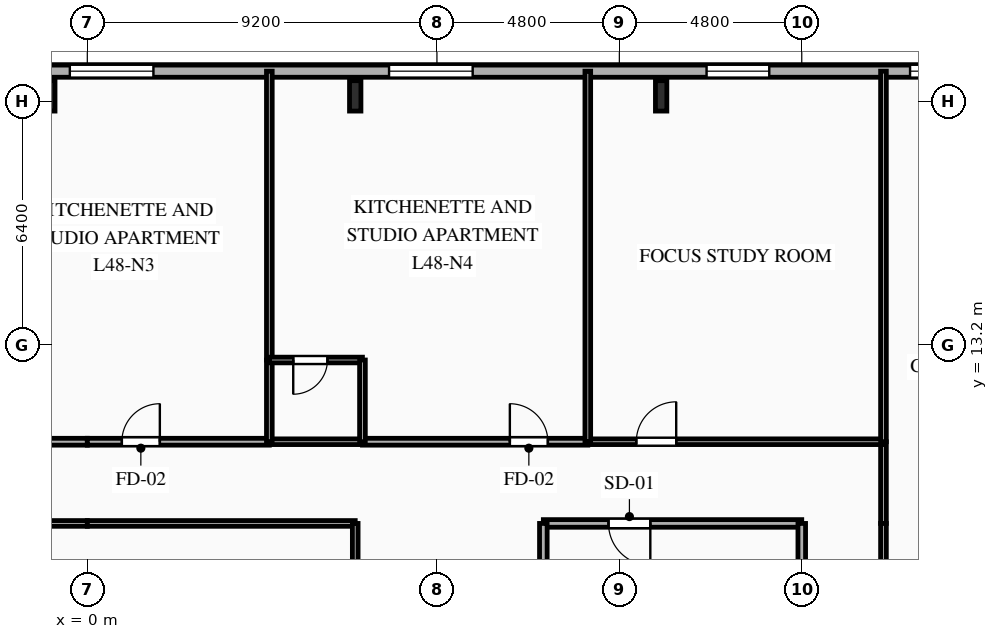
"""IFC4 building model, lengths in metres.
Left out: names, types, materials, properties, quantities, classifications, styles, units other than length and angle.
Written with IfcOpenShell. Run it as: python <this file> out.ifc"""

import sys

from ifc_helpers import new_model, si_unit, direction, frame, frame_2d, origin, origin_2d, place, context, subcontext, project, spatial, rectangle, i_section, extrude, element, fill, save


model = new_model("IFC4")
c1 = context("Model", 3, precision=1e-05, world=origin(), true_north=direction((0.0, 1.0)))
c2 = subcontext(c1, "Body", "Model", "MODEL_VIEW")
j1 = project(units=[si_unit("LENGTHUNIT", "METRE"), si_unit("PLANEANGLEUNIT", "RADIAN")], contexts=[c1])
p1 = place(None, origin())
s1 = spatial("IfcSite", under=j1, at=p1, CompositionType="ELEMENT")
p2 = place(p1, origin())
s2 = spatial("IfcBuilding", under=s1, at=p2, CompositionType="ELEMENT")
p3 = place(p2, frame((0.0, 0.0, 171.2)))
s3 = spatial("IfcBuildingStorey", under=s2, at=p3, CompositionType="ELEMENT", Elevation=171.2)
for number, where, z_axis, x_axis in (
    (1, (15.1, 19.75, 0.0), (0.0, 0.0, 1.0), (1.0, 0.0, 0.0)),
    (2, (7.05, 19.75, 0.0), (0.0, 0.0, 1.0), (1.0, 0.0, 0.0)),
    (3, (-1.0, 19.75, 0.0), (0.0, 0.0, 1.0), (1.0, 0.0, 0.0)),
):
    element("IfcColumn", number, at=place(p3, frame(where, z_axis=z_axis, x_axis=x_axis)), inside=s3, PredefinedType="COLUMN", context=c2, shape_type="SweptSolid", body=[
        extrude(i_section(OverallWidth=0.3, OverallDepth=0.8, WebThickness=0.018, FlangeThickness=0.033, FilletRadius=0.03, at=origin_2d()), origin(), (0.0, 0.0, 1.0), 3.35),
    ])
p4 = place(p3, frame((-25.8, 20.4, 0.0), z_axis=(0.0, 0.0, 1.0), x_axis=(1.0, 0.0, 0.0)))
e4 = element("IfcWall", 4, at=p4, inside=s3, PredefinedType="SOLIDWALL", context=c2, shape_type="SweptSolid", body=[
    extrude(rectangle(XDim=49.6, YDim=0.32, at=frame_2d((24.8, 0.0))), origin(), (0.0, 0.0, 1.0), 3.0),
])
p5 = place(p4, frame((2.135, 0.0, 0.85)))
e5 = element("IfcOpeningElement", 5, at=p5, cuts=e4, PredefinedType="OPENING", context=c2, shape_type="SweptSolid", body=[
    extrude(rectangle(XDim=1.65, YDim=1.85, at=frame_2d((0.825, 0.925))), frame((0.0, 0.17, 0.0), z_axis=(0.0, -1.0, 0.0), x_axis=(1.0, 0.0, 0.0)), (0.0, 0.0, 1.0), 0.34),
])
p6 = place(p4, frame((6.295, 0.0, 0.85)))
e6 = element("IfcOpeningElement", 6, at=p6, cuts=e4, PredefinedType="OPENING", context=c2, shape_type="SweptSolid", body=[
    extrude(rectangle(XDim=1.65, YDim=1.85, at=frame_2d((0.825, 0.925))), frame((0.0, 0.17, 0.0), z_axis=(0.0, -1.0, 0.0), x_axis=(1.0, 0.0, 0.0)), (0.0, 0.0, 1.0), 0.34),
])
p7 = place(p4, frame((10.775, 0.0, 0.85)))
e7 = element("IfcOpeningElement", 7, at=p7, cuts=e4, PredefinedType="OPENING", context=c2, shape_type="SweptSolid", body=[
    extrude(rectangle(XDim=1.65, YDim=1.85, at=frame_2d((0.825, 0.925))), frame((0.0, 0.17, 0.0), z_axis=(0.0, -1.0, 0.0), x_axis=(1.0, 0.0, 0.0)), (0.0, 0.0, 1.0), 0.34),
])
p8 = place(p4, frame((18.49, 0.0, 0.85)))
e8 = element("IfcOpeningElement", 8, at=p8, cuts=e4, PredefinedType="OPENING", context=c2, shape_type="SweptSolid", body=[
    extrude(rectangle(XDim=1.5, YDim=1.85, at=frame_2d((0.75, 0.925))), frame((0.0, 0.17, 0.0), z_axis=(0.0, -1.0, 0.0), x_axis=(1.0, 0.0, 0.0)), (0.0, 0.0, 1.0), 0.34),
])
p9 = place(p4, frame((25.34, 0.0, 0.85)))
e9 = element("IfcOpeningElement", 9, at=p9, cuts=e4, PredefinedType="OPENING", context=c2, shape_type="SweptSolid", body=[
    extrude(rectangle(XDim=2.2, YDim=1.85, at=frame_2d((1.1, 0.925))), frame((0.0, 0.17, 0.0), z_axis=(0.0, -1.0, 0.0), x_axis=(1.0, 0.0, 0.0)), (0.0, 0.0, 1.0), 0.34),
])
p10 = place(p4, frame((33.74, 0.0, 0.85)))
e10 = element("IfcOpeningElement", 10, at=p10, cuts=e4, PredefinedType="OPENING", context=c2, shape_type="SweptSolid", body=[
    extrude(rectangle(XDim=2.2, YDim=1.85, at=frame_2d((1.1, 0.925))), frame((0.0, 0.17, 0.0), z_axis=(0.0, -1.0, 0.0), x_axis=(1.0, 0.0, 0.0)), (0.0, 0.0, 1.0), 0.34),
])
p11 = place(p4, frame((42.095, 0.0, 0.85)))
e11 = element("IfcOpeningElement", 11, at=p11, cuts=e4, PredefinedType="OPENING", context=c2, shape_type="SweptSolid", body=[
    extrude(rectangle(XDim=1.65, YDim=1.85, at=frame_2d((0.825, 0.925))), frame((0.0, 0.17, 0.0), z_axis=(0.0, -1.0, 0.0), x_axis=(1.0, 0.0, 0.0)), (0.0, 0.0, 1.0), 0.34),
])
p12 = place(p4, frame((47.45, 0.0, 0.85)))
e12 = element("IfcOpeningElement", 12, at=p12, cuts=e4, PredefinedType="OPENING", context=c2, shape_type="SweptSolid", body=[
    extrude(rectangle(XDim=1.1, YDim=1.85, at=frame_2d((0.55, 0.925))), frame((0.0, 0.17, 0.0), z_axis=(0.0, -1.0, 0.0), x_axis=(1.0, 0.0, 0.0)), (0.0, 0.0, 1.0), 0.34),
])
p13 = place(p3, frame((18.8, 8.5, 0.0), z_axis=(0.0, 0.0, 1.0), x_axis=(-1.0, 0.0, 0.0)))
e13 = element("IfcWall", 13, at=p13, inside=s3, PredefinedType="PARTITIONING", context=c2, shape_type="SweptSolid", body=[
    extrude(rectangle(XDim=6.8, YDim=0.2, at=frame_2d((3.4, 0.0))), origin(), (0.0, 0.0, 1.0), 3.0),
])
p14 = place(p13, frame((3.985, 0.0, 0.0)))
e14 = element("IfcOpeningElement", 14, at=p14, cuts=e13, PredefinedType="OPENING", context=c2, shape_type="SweptSolid", body=[
    extrude(rectangle(XDim=1.1, YDim=2.15, at=frame_2d((0.55, 1.075))), frame((0.0, 0.11, 0.0), z_axis=(0.0, -1.0, 0.0), x_axis=(1.0, 0.0, 0.0)), (0.0, 0.0, 1.0), 0.22),
])
p15 = place(p3, frame((18.8, 5.6, 0.0), z_axis=(0.0, 0.0, 1.0), x_axis=(0.0, 1.0, 0.0)))
e15 = element("IfcWall", 15, at=p15, inside=s3, PredefinedType="PARTITIONING", context=c2, shape_type="SweptSolid", body=[
    extrude(rectangle(XDim=2.9, YDim=0.2, at=frame_2d((1.45, 0.0))), origin(), (0.0, 0.0, 1.0), 2.485),
])
p16 = place(p3, frame((12.0, 8.5, 0.0), z_axis=(0.0, 0.0, 1.0), x_axis=(0.0, -1.0, 0.0)))
e16 = element("IfcWall", 16, at=p16, inside=s3, PredefinedType="PARTITIONING", context=c2, shape_type="SweptSolid", body=[
    extrude(rectangle(XDim=2.9, YDim=0.2, at=frame_2d((1.45, 0.0))), origin(), (0.0, 0.0, 1.0), 3.0),
])
p17 = place(p3, frame((-1.14, 10.65, 0.0), z_axis=(0.0, 0.0, 1.0), x_axis=(1.0, 0.0, 0.0)))
e17 = element("IfcWall", 17, at=p17, inside=s3, PredefinedType="PARTITIONING", context=c2, shape_type="SweptSolid", body=[
    extrude(rectangle(XDim=1.14, YDim=0.18, at=frame_2d((0.57, 0.0))), origin(), (0.0, 0.0, 1.0), 3.0),
])
p18 = place(p3, frame((0.0, 8.5, 0.0), z_axis=(0.0, 0.0, 1.0), x_axis=(-1.0, 0.0, 0.0)))
e18 = element("IfcWall", 18, at=p18, inside=s3, PredefinedType="PARTITIONING", context=c2, shape_type="SweptSolid", body=[
    extrude(rectangle(XDim=7.05, YDim=0.15, at=frame_2d((3.525, 0.0))), origin(), (0.0, 0.0, 1.0), 3.0),
])
p19 = place(p3, frame((20.95, 10.65, 0.0), z_axis=(0.0, 0.0, 1.0), x_axis=(0.0, -1.0, 0.0)))
e19 = element("IfcWall", 19, at=p19, inside=s3, PredefinedType="PARTITIONING", context=c2, shape_type="SweptSolid", body=[
    extrude(rectangle(XDim=2.15, YDim=0.15, at=frame_2d((1.075, 0.0))), origin(), (0.0, 0.0, 1.0), 3.0),
])
p20 = place(p3, frame((0.0, 10.65, 0.0), z_axis=(0.0, 0.0, 1.0), x_axis=(1.0, 0.0, 0.0)))
e20 = element("IfcWall", 20, at=p20, inside=s3, PredefinedType="PARTITIONING", context=c2, shape_type="SweptSolid", body=[
    extrude(rectangle(XDim=4.79, YDim=0.18, at=frame_2d((2.395, 0.0))), origin(), (0.0, 0.0, 1.0), 3.0),
])
p21 = place(p20, frame((0.909, 0.0, 0.0)))
e21 = element("IfcOpeningElement", 21, at=p21, cuts=e20, PredefinedType="OPENING", context=c2, shape_type="SweptSolid", body=[
    extrude(rectangle(XDim=1.0, YDim=2.15, at=frame_2d((0.5, 1.075))), frame((0.0, 0.1, 0.0), z_axis=(0.0, -1.0, 0.0), x_axis=(1.0, 0.0, 0.0)), (0.0, 0.0, 1.0), 0.2),
])
p22 = place(p3, frame((7.24, 10.65, 0.0), z_axis=(0.0, 0.0, 1.0), x_axis=(1.0, 0.0, 0.0)))
e22 = element("IfcWall", 22, at=p22, inside=s3, PredefinedType="PARTITIONING", context=c2, shape_type="SweptSolid", body=[
    extrude(rectangle(XDim=5.93, YDim=0.18, at=frame_2d((2.965, 0.0))), origin(), (0.0, 0.0, 1.0), 3.0),
])
p23 = place(p22, frame((3.879, 0.0, 0.0)))
e23 = element("IfcOpeningElement", 23, at=p23, cuts=e22, PredefinedType="OPENING", context=c2, shape_type="SweptSolid", body=[
    extrude(rectangle(XDim=1.0, YDim=2.15, at=frame_2d((0.5, 1.075))), frame((0.0, 0.1, 0.0), z_axis=(0.0, -1.0, 0.0), x_axis=(1.0, 0.0, 0.0)), (0.0, 0.0, 1.0), 0.2),
])
p24 = place(p3, frame((4.79, 10.65, 0.0), z_axis=(0.0, 0.0, 1.0), x_axis=(1.0, 0.0, 0.0)))
e24 = element("IfcWall", 24, at=p24, inside=s3, PredefinedType="PLUMBINGWALL", context=c2, shape_type="SweptSolid", body=[
    extrude(rectangle(XDim=2.45, YDim=0.15, at=frame_2d((1.225, 0.0))), origin(), (0.0, 0.0, 1.0), 3.0),
])
p25 = place(p3, frame((13.17, 10.65, 0.0), z_axis=(0.0, 0.0, 1.0), x_axis=(1.0, 0.0, 0.0)))
e25 = element("IfcWall", 25, at=p25, inside=s3, PredefinedType="PARTITIONING", context=c2, shape_type="SweptSolid", body=[
    extrude(rectangle(XDim=7.78, YDim=0.15, at=frame_2d((3.89, 0.0))), origin(), (0.0, 0.0, 1.0), 3.0),
])
p26 = place(p25, frame((1.276, 0.0, 0.0)))
e26 = element("IfcOpeningElement", 26, at=p26, cuts=e25, PredefinedType="OPENING", context=c2, shape_type="SweptSolid", body=[
    extrude(rectangle(XDim=1.05, YDim=2.15, at=frame_2d((0.525, 1.075))), frame((0.0, 0.085, 0.0), z_axis=(0.0, -1.0, 0.0), x_axis=(1.0, 0.0, 0.0)), (0.0, 0.0, 1.0), 0.17),
])
p27 = place(p3, frame((7.05, 8.5, 0.0), z_axis=(0.0, 0.0, 1.0), x_axis=(-1.0, 0.0, 0.0)))
e27 = element("IfcWall", 27, at=p27, inside=s3, PredefinedType="PARTITIONING", context=c2, shape_type="SweptSolid", body=[
    extrude(rectangle(XDim=7.05, YDim=0.15, at=frame_2d((3.525, 0.0))), origin(), (0.0, 0.0, 1.0), 3.0),
])
p28 = place(p3, frame((20.95, 8.5, 0.0), z_axis=(0.0, 0.0, 1.0), x_axis=(0.0, -1.0, 0.0)))
e28 = element("IfcWall", 28, at=p28, inside=s3, PredefinedType="PARTITIONING", context=c2, shape_type="SweptSolid", body=[
    extrude(rectangle(XDim=6.1, YDim=0.15, at=frame_2d((3.05, 0.0))), origin(), (0.0, 0.0, 1.0), 3.0),
])
p29 = place(p28, frame((3.984, 0.0, 0.0)))
e29 = element("IfcOpeningElement", 29, at=p29, cuts=e28, PredefinedType="OPENING", context=c2, shape_type="SweptSolid", body=[
    extrude(rectangle(XDim=1.05, YDim=2.15, at=frame_2d((0.525, 1.075))), frame((0.0, 0.085, 0.0), z_axis=(0.0, -1.0, 0.0), x_axis=(1.0, 0.0, 0.0)), (0.0, 0.0, 1.0), 0.17),
])
p30 = place(p3, frame((7.05, -0.8, 0.0), z_axis=(0.0, 0.0, 1.0), x_axis=(0.0, 1.0, 0.0)))
e30 = element("IfcWall", 30, at=p30, inside=s3, PredefinedType="PARTITIONING", context=c2, shape_type="SweptSolid", body=[
    extrude(rectangle(XDim=9.3, YDim=0.15, at=frame_2d((4.65, 0.0))), origin(), (0.0, 0.0, 1.0), 3.0),
])
p31 = place(p3, frame((20.95, 10.65, 0.0), z_axis=(0.0, 0.0, 1.0), x_axis=(0.0, 1.0, 0.0)))
e31 = element("IfcWall", 31, at=p31, inside=s3, PredefinedType="PARTITIONING", context=c2, shape_type="SweptSolid", body=[
    extrude(rectangle(XDim=9.75, YDim=0.15, at=frame_2d((4.875, 0.0))), origin(), (0.0, 0.0, 1.0), 2.485),
])
p32 = place(p3, frame((4.79, 20.4, 0.0), z_axis=(0.0, 0.0, 1.0), x_axis=(0.0, -1.0, 0.0)))
e32 = element("IfcWall", 32, at=p32, inside=s3, PredefinedType="PARTITIONING", context=c2, shape_type="SweptSolid", body=[
    extrude(rectangle(XDim=7.6, YDim=0.15, at=frame_2d((3.8, 0.0))), origin(), (0.0, 0.0, 1.0), 3.0),
])
p33 = place(p3, frame((4.79, 12.8, 0.0), z_axis=(0.0, 0.0, 1.0), x_axis=(0.0, -1.0, 0.0)))
e33 = element("IfcWall", 33, at=p33, inside=s3, PredefinedType="PLUMBINGWALL", context=c2, shape_type="SweptSolid", body=[
    extrude(rectangle(XDim=2.15, YDim=0.15, at=frame_2d((1.075, 0.0))), origin(), (0.0, 0.0, 1.0), 3.0),
])
p34 = place(p3, frame((7.24, 12.8, 0.0), z_axis=(0.0, 0.0, 1.0), x_axis=(-1.0, 0.0, 0.0)))
e34 = element("IfcWall", 34, at=p34, inside=s3, PredefinedType="PLUMBINGWALL", context=c2, shape_type="SweptSolid", body=[
    extrude(rectangle(XDim=2.45, YDim=0.15, at=frame_2d((1.225, 0.0))), origin(), (0.0, 0.0, 1.0), 3.0),
])
p35 = place(p34, frame((0.921, 0.0, 0.0)))
e35 = element("IfcOpeningElement", 35, at=p35, cuts=e34, PredefinedType="OPENING", context=c2, shape_type="SweptSolid", body=[
    extrude(rectangle(XDim=0.9, YDim=2.1, at=frame_2d((0.45, 1.05))), frame((0.0, 0.085, 0.0), z_axis=(0.0, -1.0, 0.0), x_axis=(1.0, 0.0, 0.0)), (0.0, 0.0, 1.0), 0.17),
])
p36 = place(p3, frame((7.24, 10.65, 0.0), z_axis=(0.0, 0.0, 1.0), x_axis=(0.0, 1.0, 0.0)))
e36 = element("IfcWall", 36, at=p36, inside=s3, PredefinedType="PLUMBINGWALL", context=c2, shape_type="SweptSolid", body=[
    extrude(rectangle(XDim=2.15, YDim=0.15, at=frame_2d((1.075, 0.0))), origin(), (0.0, 0.0, 1.0), 3.0),
])
p37 = place(p3, frame((13.17, 20.4, 0.0), z_axis=(0.0, 0.0, 1.0), x_axis=(0.0, -1.0, 0.0)))
e37 = element("IfcWall", 37, at=p37, inside=s3, PredefinedType="PARTITIONING", context=c2, shape_type="SweptSolid", body=[
    extrude(rectangle(XDim=9.75, YDim=0.15, at=frame_2d((4.875, 0.0))), origin(), (0.0, 0.0, 1.0), 3.0),
])
p38 = place(p9, origin())
e38 = element("IfcWindow", 38, at=p38, inside=s3, PartitioningType="SINGLE_PANEL", PredefinedType="WINDOW", context=c2, shape_type="SweptSolid", body=[
    extrude(rectangle(XDim=2.2, YDim=1.85, at=frame_2d((1.1, 0.925))), frame((0.0, 0.03, 0.0), z_axis=(0.0, -1.0, 0.0), x_axis=(1.0, 0.0, 0.0)), (0.0, 0.0, 1.0), 0.06),
])
fill(e9, e38)
p39 = place(p10, origin())
e39 = element("IfcWindow", 39, at=p39, inside=s3, PartitioningType="SINGLE_PANEL", PredefinedType="WINDOW", context=c2, shape_type="SweptSolid", body=[
    extrude(rectangle(XDim=2.2, YDim=1.85, at=frame_2d((1.1, 0.925))), frame((0.0, 0.03, 0.0), z_axis=(0.0, -1.0, 0.0), x_axis=(1.0, 0.0, 0.0)), (0.0, 0.0, 1.0), 0.06),
])
fill(e10, e39)
p40 = place(p11, origin())
e40 = element("IfcWindow", 40, at=p40, inside=s3, PartitioningType="SINGLE_PANEL", PredefinedType="WINDOW", context=c2, shape_type="SweptSolid", body=[
    extrude(rectangle(XDim=1.65, YDim=1.85, at=frame_2d((0.825, 0.925))), frame((0.0, 0.03, 0.0), z_axis=(0.0, -1.0, 0.0), x_axis=(1.0, 0.0, 0.0)), (0.0, 0.0, 1.0), 0.06),
])
fill(e11, e40)
p41 = place(p12, origin())
e41 = element("IfcWindow", 41, at=p41, inside=s3, PartitioningType="SINGLE_PANEL", PredefinedType="WINDOW", context=c2, shape_type="SweptSolid", body=[
    extrude(rectangle(XDim=1.1, YDim=1.85, at=frame_2d((0.55, 0.925))), frame((0.0, 0.03, 0.0), z_axis=(0.0, -1.0, 0.0), x_axis=(1.0, 0.0, 0.0)), (0.0, 0.0, 1.0), 0.06),
])
fill(e12, e41)
p42 = place(p14, origin())
e42 = element("IfcDoor", 42, at=p42, inside=s3, OperationType="SINGLE_SWING_LEFT", PredefinedType="DOOR", context=c2, shape_type="SweptSolid", body=[
    extrude(rectangle(XDim=1.1, YDim=2.15, at=frame_2d((0.55, 1.075))), frame((0.0, 0.025, 0.0), z_axis=(0.0, -1.0, 0.0), x_axis=(1.0, 0.0, 0.0)), (0.0, 0.0, 1.0), 0.05),
])
fill(e14, e42)
p43 = place(p21, origin())
e43 = element("IfcDoor", 43, at=p43, inside=s3, OperationType="SINGLE_SWING_RIGHT", PredefinedType="DOOR", context=c2, shape_type="SweptSolid", body=[
    extrude(rectangle(XDim=1.0, YDim=2.15, at=frame_2d((0.5, 1.075))), frame((0.0, 0.025, 0.0), z_axis=(0.0, -1.0, 0.0), x_axis=(1.0, 0.0, 0.0)), (0.0, 0.0, 1.0), 0.05),
])
fill(e21, e43)
p44 = place(p23, origin())
e44 = element("IfcDoor", 44, at=p44, inside=s3, OperationType="SINGLE_SWING_LEFT", PredefinedType="DOOR", context=c2, shape_type="SweptSolid", body=[
    extrude(rectangle(XDim=1.0, YDim=2.15, at=frame_2d((0.5, 1.075))), frame((0.0, 0.025, 0.0), z_axis=(0.0, -1.0, 0.0), x_axis=(1.0, 0.0, 0.0)), (0.0, 0.0, 1.0), 0.05),
])
fill(e23, e44)
p45 = place(p26, origin())
e45 = element("IfcDoor", 45, at=p45, inside=s3, OperationType="SINGLE_SWING_RIGHT", PredefinedType="DOOR", context=c2, shape_type="SweptSolid", body=[
    extrude(rectangle(XDim=1.05, YDim=2.15, at=frame_2d((0.525, 1.075))), frame((0.0, 0.025, 0.0), z_axis=(0.0, -1.0, 0.0), x_axis=(1.0, 0.0, 0.0)), (0.0, 0.0, 1.0), 0.05),
])
fill(e26, e45)
p46 = place(p35, origin())
e46 = element("IfcDoor", 46, at=p46, inside=s3, OperationType="SINGLE_SWING_RIGHT", PredefinedType="DOOR", context=c2, shape_type="SweptSolid", body=[
    extrude(rectangle(XDim=0.9, YDim=2.1, at=frame_2d((0.45, 1.05))), frame((0.0, 0.025, 0.0), z_axis=(0.0, -1.0, 0.0), x_axis=(1.0, 0.0, 0.0)), (0.0, 0.0, 1.0), 0.05),
])
fill(e35, e46)
save(model, sys.argv[1])
